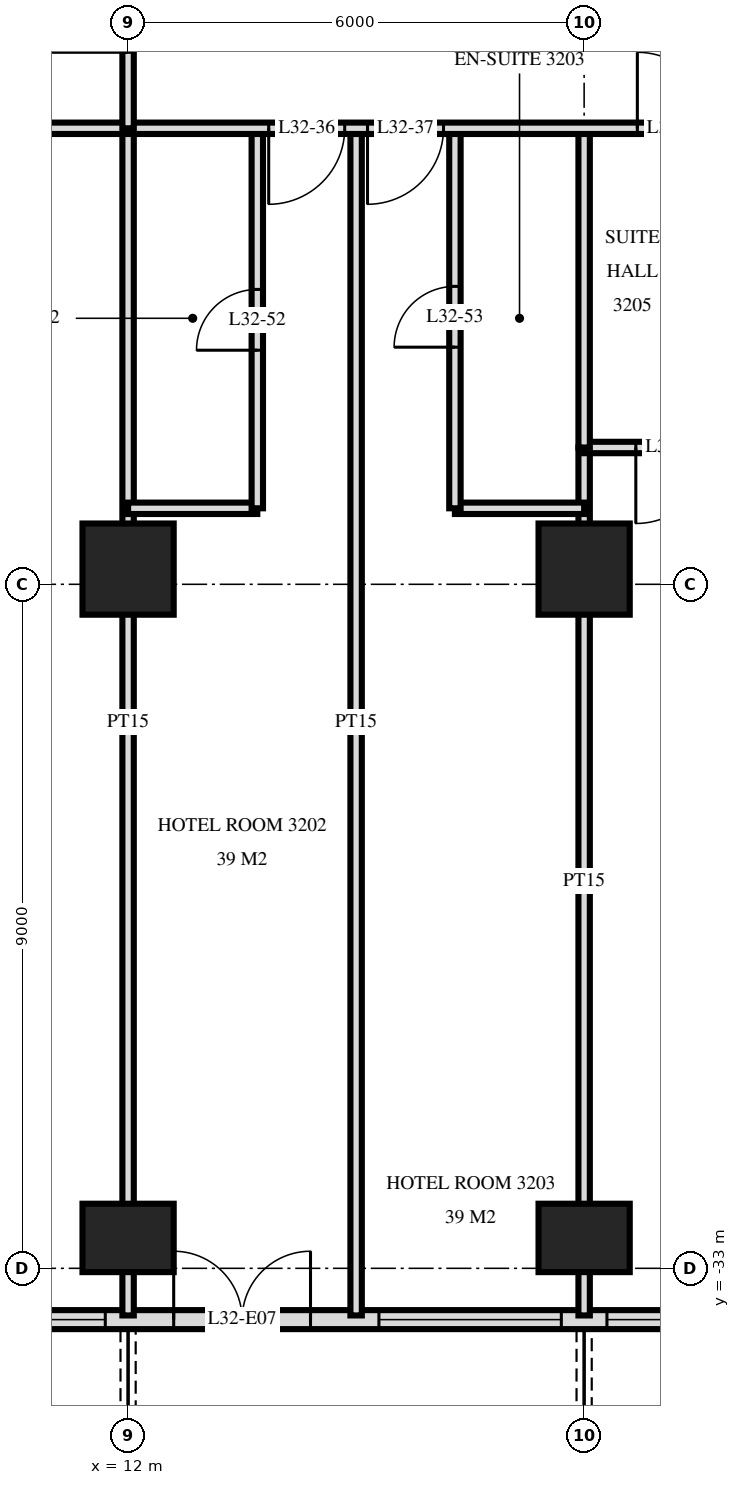
"""IFC4 building model, lengths in metres.
Left out: names, types, materials, properties, quantities, classifications, styles, units other than length and angle.
Written with IfcOpenShell. Run it as: python <this file> out.ifc"""

import sys

from ifc_helpers import new_model, si_unit, direction, frame, frame_2d, origin, origin_2d, place, context, subcontext, project, spatial, rectangle, extrude, element, fill, save


model = new_model("IFC4")
c1 = context("Model", 3, precision=1e-05, world=origin(), true_north=direction((0.0, 1.0)))
c2 = subcontext(c1, "Body", "Model", "MODEL_VIEW")
j1 = project(units=[si_unit("LENGTHUNIT", "METRE"), si_unit("PLANEANGLEUNIT", "RADIAN")], contexts=[c1])
p1 = place(None, origin())
s1 = spatial("IfcSite", under=j1, at=p1, CompositionType="ELEMENT")
p2 = place(p1, origin())
s2 = spatial("IfcBuilding", under=s1, at=p2, CompositionType="ELEMENT")
p3 = place(p2, frame((0.0, 0.0, 127.2)))
s3 = spatial("IfcBuildingStorey", under=s2, at=p3, CompositionType="ELEMENT", Elevation=127.2)
p4 = place(p3, frame((12.0, -32.6, 0.0), z_axis=(0.0, 0.0, 1.0), x_axis=(1.0, 0.0, 0.0)))
e1 = element("IfcColumn", 1, at=p4, inside=s3, PredefinedType="COLUMN", context=c2, shape_type="SweptSolid", body=[
    extrude(rectangle(XDim=1.2, YDim=0.9, at=origin_2d()), origin(), (0.0, 0.0, 1.0), 3.6),
])
p5 = place(p3, frame((12.0, -23.8, 0.0), z_axis=(0.0, 0.0, 1.0), x_axis=(1.0, 0.0, 0.0)))
e2 = element("IfcColumn", 2, at=p5, inside=s3, PredefinedType="COLUMN", context=c2, shape_type="SweptSolid", body=[
    extrude(rectangle(XDim=1.2, YDim=1.2, at=origin_2d()), origin(), (0.0, 0.0, 1.0), 3.6),
])
p6 = place(p3, frame((18.0, -32.6, 0.0), z_axis=(0.0, 0.0, 1.0), x_axis=(1.0, 0.0, 0.0)))
e3 = element("IfcColumn", 3, at=p6, inside=s3, PredefinedType="COLUMN", context=c2, shape_type="SweptSolid", body=[
    extrude(rectangle(XDim=1.2, YDim=0.9, at=origin_2d()), origin(), (0.0, 0.0, 1.0), 3.6),
])
p7 = place(p3, frame((18.0, -23.8, 0.0), z_axis=(0.0, 0.0, 1.0), x_axis=(1.0, 0.0, 0.0)))
e4 = element("IfcColumn", 4, at=p7, inside=s3, PredefinedType="COLUMN", context=c2, shape_type="SweptSolid", body=[
    extrude(rectangle(XDim=1.2, YDim=1.2, at=origin_2d()), origin(), (0.0, 0.0, 1.0), 3.6),
])
p8 = place(p3, frame((-23.675, -33.675, 0.0), z_axis=(0.0, 0.0, 1.0), x_axis=(1.0, 0.0, 0.0)))
e5 = element("IfcWall", 5, at=p8, inside=s3, PredefinedType="SOLIDWALL", context=c2, shape_type="SweptSolid", body=[
    extrude(rectangle(XDim=47.351, YDim=0.25, at=frame_2d((23.675, 0.0))), origin(), (0.0, 0.0, 1.0), 3.32),
])
p9 = place(p8, frame((3.425, 0.0, 0.0)))
e6 = element("IfcOpeningElement", 6, at=p9, cuts=e5, PredefinedType="OPENING", context=c2, shape_type="SweptSolid", body=[
    extrude(rectangle(XDim=1.8, YDim=2.4, at=frame_2d((0.9, 1.2))), frame((0.0, 0.135, 0.0), z_axis=(0.0, -1.0, 0.0), x_axis=(1.0, 0.0, 0.0)), (0.0, 0.0, 1.0), 0.27),
])
p10 = place(p8, frame((6.275, 0.0, 0.0)))
e7 = element("IfcOpeningElement", 7, at=p10, cuts=e5, PredefinedType="OPENING", context=c2, shape_type="SweptSolid", body=[
    extrude(rectangle(XDim=1.8, YDim=2.4, at=frame_2d((0.9, 1.2))), frame((0.0, 0.135, 0.0), z_axis=(0.0, -1.0, 0.0), x_axis=(1.0, 0.0, 0.0)), (0.0, 0.0, 1.0), 0.27),
])
p11 = place(p8, frame((8.975, 0.0, 0.3)))
e8 = element("IfcOpeningElement", 8, at=p11, cuts=e5, PredefinedType="OPENING", context=c2, shape_type="SweptSolid", body=[
    extrude(rectangle(XDim=2.4, YDim=2.1, at=frame_2d((1.2, 1.05))), frame((0.0, 0.135, 0.0), z_axis=(0.0, -1.0, 0.0), x_axis=(1.0, 0.0, 0.0)), (0.0, 0.0, 1.0), 0.27),
])
p12 = place(p8, frame((12.275, 0.0, 0.0)))
e9 = element("IfcOpeningElement", 9, at=p12, cuts=e5, PredefinedType="OPENING", context=c2, shape_type="SweptSolid", body=[
    extrude(rectangle(XDim=1.8, YDim=2.4, at=frame_2d((0.9, 1.2))), frame((0.0, 0.135, 0.0), z_axis=(0.0, -1.0, 0.0), x_axis=(1.0, 0.0, 0.0)), (0.0, 0.0, 1.0), 0.27),
])
p13 = place(p8, frame((14.975, 0.0, 0.3)))
e10 = element("IfcOpeningElement", 10, at=p13, cuts=e5, PredefinedType="OPENING", context=c2, shape_type="SweptSolid", body=[
    extrude(rectangle(XDim=2.4, YDim=2.1, at=frame_2d((1.2, 1.05))), frame((0.0, 0.135, 0.0), z_axis=(0.0, -1.0, 0.0), x_axis=(1.0, 0.0, 0.0)), (0.0, 0.0, 1.0), 0.27),
])
p14 = place(p8, frame((17.975, 0.0, 0.3)))
e11 = element("IfcOpeningElement", 11, at=p14, cuts=e5, PredefinedType="OPENING", context=c2, shape_type="SweptSolid", body=[
    extrude(rectangle(XDim=2.4, YDim=2.1, at=frame_2d((1.2, 1.05))), frame((0.0, 0.135, 0.0), z_axis=(0.0, -1.0, 0.0), x_axis=(1.0, 0.0, 0.0)), (0.0, 0.0, 1.0), 0.27),
])
p15 = place(p8, frame((21.275, 0.0, 0.0)))
e12 = element("IfcOpeningElement", 12, at=p15, cuts=e5, PredefinedType="OPENING", context=c2, shape_type="SweptSolid", body=[
    extrude(rectangle(XDim=1.8, YDim=2.4, at=frame_2d((0.9, 1.2))), frame((0.0, 0.135, 0.0), z_axis=(0.0, -1.0, 0.0), x_axis=(1.0, 0.0, 0.0)), (0.0, 0.0, 1.0), 0.27),
])
p16 = place(p8, frame((24.275, 0.0, 0.0)))
e13 = element("IfcOpeningElement", 13, at=p16, cuts=e5, PredefinedType="OPENING", context=c2, shape_type="SweptSolid", body=[
    extrude(rectangle(XDim=1.8, YDim=2.4, at=frame_2d((0.9, 1.2))), frame((0.0, 0.135, 0.0), z_axis=(0.0, -1.0, 0.0), x_axis=(1.0, 0.0, 0.0)), (0.0, 0.0, 1.0), 0.27),
])
p17 = place(p8, frame((26.975, 0.0, 0.3)))
e14 = element("IfcOpeningElement", 14, at=p17, cuts=e5, PredefinedType="OPENING", context=c2, shape_type="SweptSolid", body=[
    extrude(rectangle(XDim=2.4, YDim=2.1, at=frame_2d((1.2, 1.05))), frame((0.0, 0.135, 0.0), z_axis=(0.0, -1.0, 0.0), x_axis=(1.0, 0.0, 0.0)), (0.0, 0.0, 1.0), 0.27),
])
p18 = place(p8, frame((30.275, 0.0, 0.0)))
e15 = element("IfcOpeningElement", 15, at=p18, cuts=e5, PredefinedType="OPENING", context=c2, shape_type="SweptSolid", body=[
    extrude(rectangle(XDim=1.8, YDim=2.4, at=frame_2d((0.9, 1.2))), frame((0.0, 0.135, 0.0), z_axis=(0.0, -1.0, 0.0), x_axis=(1.0, 0.0, 0.0)), (0.0, 0.0, 1.0), 0.27),
])
p19 = place(p8, frame((32.975, 0.0, 0.3)))
e16 = element("IfcOpeningElement", 16, at=p19, cuts=e5, PredefinedType="OPENING", context=c2, shape_type="SweptSolid", body=[
    extrude(rectangle(XDim=2.4, YDim=2.1, at=frame_2d((1.2, 1.05))), frame((0.0, 0.135, 0.0), z_axis=(0.0, -1.0, 0.0), x_axis=(1.0, 0.0, 0.0)), (0.0, 0.0, 1.0), 0.27),
])
p20 = place(p8, frame((36.275, 0.0, 0.0)))
e17 = element("IfcOpeningElement", 17, at=p20, cuts=e5, PredefinedType="OPENING", context=c2, shape_type="SweptSolid", body=[
    extrude(rectangle(XDim=1.8, YDim=2.4, at=frame_2d((0.9, 1.2))), frame((0.0, 0.135, 0.0), z_axis=(0.0, -1.0, 0.0), x_axis=(1.0, 0.0, 0.0)), (0.0, 0.0, 1.0), 0.27),
])
p21 = place(p8, frame((38.975, 0.0, 0.3)))
e18 = element("IfcOpeningElement", 18, at=p21, cuts=e5, PredefinedType="OPENING", context=c2, shape_type="SweptSolid", body=[
    extrude(rectangle(XDim=2.4, YDim=2.1, at=frame_2d((1.2, 1.05))), frame((0.0, 0.135, 0.0), z_axis=(0.0, -1.0, 0.0), x_axis=(1.0, 0.0, 0.0)), (0.0, 0.0, 1.0), 0.27),
])
p22 = place(p8, frame((41.975, 0.0, 0.3)))
e19 = element("IfcOpeningElement", 19, at=p22, cuts=e5, PredefinedType="OPENING", context=c2, shape_type="SweptSolid", body=[
    extrude(rectangle(XDim=2.4, YDim=2.1, at=frame_2d((1.2, 1.05))), frame((0.0, 0.135, 0.0), z_axis=(0.0, -1.0, 0.0), x_axis=(1.0, 0.0, 0.0)), (0.0, 0.0, 1.0), 0.27),
])
p23 = place(p8, frame((45.125, 0.0, 0.0)))
e20 = element("IfcOpeningElement", 20, at=p23, cuts=e5, PredefinedType="OPENING", context=c2, shape_type="SweptSolid", body=[
    extrude(rectangle(XDim=1.8, YDim=2.4, at=frame_2d((0.9, 1.2))), frame((0.0, 0.135, 0.0), z_axis=(0.0, -1.0, 0.0), x_axis=(1.0, 0.0, 0.0)), (0.0, 0.0, 1.0), 0.27),
])
p24 = place(p3, frame((18.0, -22.2, 0.0), z_axis=(0.0, 0.0, 1.0), x_axis=(0.0, 1.0, 0.0)))
e21 = element("IfcWall", 21, at=p24, inside=s3, PredefinedType="PARTITIONING", context=c2, shape_type="SweptSolid", body=[
    extrude(rectangle(XDim=4.2, YDim=0.15, at=frame_2d((2.1, 0.0))), origin(), (0.0, 0.0, 1.0), 3.32),
])
p25 = place(p3, frame((18.0, -33.62, 0.0), z_axis=(0.0, 0.0, 1.0), x_axis=(0.0, 1.0, 0.0)))
e22 = element("IfcWall", 22, at=p25, inside=s3, PredefinedType="PARTITIONING", context=c2, shape_type="SweptSolid", body=[
    extrude(rectangle(XDim=11.42, YDim=0.15, at=frame_2d((5.71, 0.0))), origin(), (0.0, 0.0, 1.0), 3.32),
])
p26 = place(p3, frame((16.3, -23.0, 0.0), z_axis=(0.0, 0.0, 1.0), x_axis=(0.0, 1.0, 0.0)))
e23 = element("IfcWall", 23, at=p26, inside=s3, PredefinedType="PARTITIONING", context=c2, shape_type="SweptSolid", body=[
    extrude(rectangle(XDim=5.0, YDim=0.15, at=frame_2d((2.5, 0.0))), origin(), (0.0, 0.0, 1.0), 3.32),
])
p27 = place(p26, frame((2.12, 0.0, 0.0)))
e24 = element("IfcOpeningElement", 24, at=p27, cuts=e23, PredefinedType="OPENING", context=c2, shape_type="SweptSolid", body=[
    extrude(rectangle(XDim=0.8, YDim=2.1, at=frame_2d((0.4, 1.05))), frame((0.0, 0.085, 0.0), z_axis=(0.0, -1.0, 0.0), x_axis=(1.0, 0.0, 0.0)), (0.0, 0.0, 1.0), 0.17),
])
p28 = place(p3, frame((15.0, -33.62, 0.0), z_axis=(0.0, 0.0, 1.0), x_axis=(0.0, 1.0, 0.0)))
e25 = element("IfcWall", 25, at=p28, inside=s3, PredefinedType="PARTITIONING", context=c2, shape_type="SweptSolid", body=[
    extrude(rectangle(XDim=15.62, YDim=0.15, at=frame_2d((7.81, 0.0))), origin(), (0.0, 0.0, 1.0), 3.32),
])
p29 = place(p3, frame((13.7, -23.0, 0.0), z_axis=(0.0, 0.0, 1.0), x_axis=(0.0, 1.0, 0.0)))
e26 = element("IfcWall", 26, at=p29, inside=s3, PredefinedType="PARTITIONING", context=c2, shape_type="SweptSolid", body=[
    extrude(rectangle(XDim=5.0, YDim=0.15, at=frame_2d((2.5, 0.0))), origin(), (0.0, 0.0, 1.0), 3.32),
])
p30 = place(p29, frame((2.08, 0.0, 0.0)))
e27 = element("IfcOpeningElement", 27, at=p30, cuts=e26, PredefinedType="OPENING", context=c2, shape_type="SweptSolid", body=[
    extrude(rectangle(XDim=0.8, YDim=2.1, at=frame_2d((0.4, 1.05))), frame((0.0, 0.085, 0.0), z_axis=(0.0, -1.0, 0.0), x_axis=(1.0, 0.0, 0.0)), (0.0, 0.0, 1.0), 0.17),
])
p31 = place(p3, frame((12.0, -18.0, 0.0), z_axis=(0.0, 0.0, 1.0), x_axis=(0.0, 1.0, 0.0)))
e28 = element("IfcWall", 28, at=p31, inside=s3, PredefinedType="PARTITIONING", context=c2, shape_type="SweptSolid", body=[
    extrude(rectangle(XDim=2.95, YDim=0.15, at=frame_2d((1.475, 0.0))), origin(), (0.0, 0.0, 1.0), 3.32),
])
p32 = place(p31, frame((1.0, 0.0, 0.0)))
e29 = element("IfcOpeningElement", 29, at=p32, cuts=e28, PredefinedType="OPENING", context=c2, shape_type="SweptSolid", body=[
    extrude(rectangle(XDim=1.0, YDim=2.1, at=frame_2d((0.5, 1.05))), frame((0.0, 0.085, 0.0), z_axis=(0.0, -1.0, 0.0), x_axis=(1.0, 0.0, 0.0)), (0.0, 0.0, 1.0), 0.17),
])
p33 = place(p3, frame((12.0, -33.62, 0.0), z_axis=(0.0, 0.0, 1.0), x_axis=(0.0, 1.0, 0.0)))
e30 = element("IfcWall", 30, at=p33, inside=s3, PredefinedType="PARTITIONING", context=c2, shape_type="SweptSolid", body=[
    extrude(rectangle(XDim=15.62, YDim=0.15, at=frame_2d((7.81, 0.0))), origin(), (0.0, 0.0, 1.0), 3.32),
])
for number, where, z_axis, x_axis in (
    (31, (12.0, -23.0, 0.0), (0.0, 0.0, 1.0), (1.0, 0.0, 0.0)),
    (32, (16.3, -23.0, 0.0), (0.0, 0.0, 1.0), (1.0, 0.0, 0.0)),
):
    element("IfcWall", number, at=place(p3, frame(where, z_axis=z_axis, x_axis=x_axis)), inside=s3, PredefinedType="PARTITIONING", context=c2, shape_type="SweptSolid", body=[
        extrude(rectangle(XDim=1.7, YDim=0.15, at=frame_2d((0.85, 0.0))), origin(), (0.0, 0.0, 1.0), 3.32),
    ])
p34 = place(p3, frame((18.0, -22.2, 0.0), z_axis=(0.0, 0.0, 1.0), x_axis=(1.0, 0.0, 0.0)))
e33 = element("IfcWall", 33, at=p34, inside=s3, PredefinedType="PARTITIONING", context=c2, shape_type="SweptSolid", body=[
    extrude(rectangle(XDim=2.4, YDim=0.15, at=frame_2d((1.2, 0.0))), origin(), (0.0, 0.0, 1.0), 3.32),
])
p35 = place(p34, frame((0.68, 0.0, 0.0)))
e34 = element("IfcOpeningElement", 34, at=p35, cuts=e33, PredefinedType="OPENING", context=c2, shape_type="SweptSolid", body=[
    extrude(rectangle(XDim=1.0, YDim=2.1, at=frame_2d((0.5, 1.05))), frame((0.0, 0.085, 0.0), z_axis=(0.0, -1.0, 0.0), x_axis=(1.0, 0.0, 0.0)), (0.0, 0.0, 1.0), 0.17),
])
p36 = place(p3, frame((-28.02, -18.0, 0.0), z_axis=(0.0, 0.0, 1.0), x_axis=(1.0, 0.0, 0.0)))
e35 = element("IfcWall", 35, at=p36, inside=s3, PredefinedType="PARTITIONING", context=c2, shape_type="SweptSolid", body=[
    extrude(rectangle(XDim=56.04, YDim=0.15, at=frame_2d((28.02, 0.0))), origin(), (0.0, 0.0, 1.0), 3.32),
])
p37 = place(p36, frame((13.17, 0.0, 0.0)))
e36 = element("IfcOpeningElement", 36, at=p37, cuts=e35, PredefinedType="OPENING", context=c2, shape_type="SweptSolid", body=[
    extrude(rectangle(XDim=1.0, YDim=2.1, at=frame_2d((0.5, 1.05))), frame((0.0, 0.085, 0.0), z_axis=(0.0, -1.0, 0.0), x_axis=(1.0, 0.0, 0.0)), (0.0, 0.0, 1.0), 0.17),
])
p38 = place(p36, frame((11.32, 0.0, 0.0)))
e37 = element("IfcOpeningElement", 37, at=p38, cuts=e35, PredefinedType="OPENING", context=c2, shape_type="SweptSolid", body=[
    extrude(rectangle(XDim=1.0, YDim=2.1, at=frame_2d((0.5, 1.05))), frame((0.0, 0.085, 0.0), z_axis=(0.0, -1.0, 0.0), x_axis=(1.0, 0.0, 0.0)), (0.0, 0.0, 1.0), 0.17),
])
p39 = place(p36, frame((41.87, 0.0, 0.0)))
e38 = element("IfcOpeningElement", 38, at=p39, cuts=e35, PredefinedType="OPENING", context=c2, shape_type="SweptSolid", body=[
    extrude(rectangle(XDim=1.0, YDim=2.1, at=frame_2d((0.5, 1.05))), frame((0.0, 0.085, 0.0), z_axis=(0.0, -1.0, 0.0), x_axis=(1.0, 0.0, 0.0)), (0.0, 0.0, 1.0), 0.17),
])
p40 = place(p36, frame((43.17, 0.0, 0.0)))
e39 = element("IfcOpeningElement", 39, at=p40, cuts=e35, PredefinedType="OPENING", context=c2, shape_type="SweptSolid", body=[
    extrude(rectangle(XDim=1.0, YDim=2.1, at=frame_2d((0.5, 1.05))), frame((0.0, 0.085, 0.0), z_axis=(0.0, -1.0, 0.0), x_axis=(1.0, 0.0, 0.0)), (0.0, 0.0, 1.0), 0.17),
])
p41 = place(p36, frame((46.72, 0.0, 0.0)))
e40 = element("IfcOpeningElement", 40, at=p41, cuts=e35, PredefinedType="OPENING", context=c2, shape_type="SweptSolid", body=[
    extrude(rectangle(XDim=1.0, YDim=2.1, at=frame_2d((0.5, 1.05))), frame((0.0, 0.085, 0.0), z_axis=(0.0, -1.0, 0.0), x_axis=(1.0, 0.0, 0.0)), (0.0, 0.0, 1.0), 0.17),
])
p42 = place(p36, frame((21.52, 0.0, 0.0)))
e41 = element("IfcOpeningElement", 41, at=p42, cuts=e35, PredefinedType="OPENING", context=c2, shape_type="SweptSolid", body=[
    extrude(rectangle(XDim=1.0, YDim=2.1, at=frame_2d((0.5, 1.05))), frame((0.0, 0.085, 0.0), z_axis=(0.0, -1.0, 0.0), x_axis=(1.0, 0.0, 0.0)), (0.0, 0.0, 1.0), 0.17),
])
p43 = place(p36, frame((33.52, 0.0, 0.0)))
e42 = element("IfcOpeningElement", 42, at=p43, cuts=e35, PredefinedType="OPENING", context=c2, shape_type="SweptSolid", body=[
    extrude(rectangle(XDim=1.0, YDim=2.1, at=frame_2d((0.5, 1.05))), frame((0.0, 0.085, 0.0), z_axis=(0.0, -1.0, 0.0), x_axis=(1.0, 0.0, 0.0)), (0.0, 0.0, 1.0), 0.17),
])
p44 = place(p19, origin())
e43 = element("IfcWindow", 43, at=p44, inside=s3, PartitioningType="SINGLE_PANEL", PredefinedType="WINDOW", context=c2, shape_type="SweptSolid", body=[
    extrude(rectangle(XDim=2.4, YDim=2.1, at=frame_2d((1.2, 1.05))), frame((0.0, 0.03, 0.0), z_axis=(0.0, -1.0, 0.0), x_axis=(1.0, 0.0, 0.0)), (0.0, 0.0, 1.0), 0.06),
])
fill(e16, e43)
p45 = place(p20, origin())
e44 = element("IfcDoor", 44, at=p45, inside=s3, OperationType="DOUBLE_DOOR_SINGLE_SWING", PredefinedType="DOOR", context=c2, shape_type="SweptSolid", body=[
    extrude(rectangle(XDim=1.8, YDim=2.4, at=frame_2d((0.9, 1.2))), frame((0.0, 0.025, 0.0), z_axis=(0.0, -1.0, 0.0), x_axis=(1.0, 0.0, 0.0)), (0.0, 0.0, 1.0), 0.05),
])
fill(e17, e44)
p46 = place(p21, origin())
e45 = element("IfcWindow", 45, at=p46, inside=s3, PartitioningType="SINGLE_PANEL", PredefinedType="WINDOW", context=c2, shape_type="SweptSolid", body=[
    extrude(rectangle(XDim=2.4, YDim=2.1, at=frame_2d((1.2, 1.05))), frame((0.0, 0.03, 0.0), z_axis=(0.0, -1.0, 0.0), x_axis=(1.0, 0.0, 0.0)), (0.0, 0.0, 1.0), 0.06),
])
fill(e18, e45)
p47 = place(p22, origin())
e46 = element("IfcWindow", 46, at=p47, inside=s3, PartitioningType="SINGLE_PANEL", PredefinedType="WINDOW", context=c2, shape_type="SweptSolid", body=[
    extrude(rectangle(XDim=2.4, YDim=2.1, at=frame_2d((1.2, 1.05))), frame((0.0, 0.03, 0.0), z_axis=(0.0, -1.0, 0.0), x_axis=(1.0, 0.0, 0.0)), (0.0, 0.0, 1.0), 0.06),
])
fill(e19, e46)
p48 = place(p39, frame((0.5, 0.0, 0.0), z_axis=(0.0, 0.0, 1.0), x_axis=(-1.0, 0.0, 0.0)))
e47 = element("IfcDoor", 47, at=p48, inside=s3, OperationType="SINGLE_SWING_LEFT", PredefinedType="DOOR", context=c2, shape_type="SweptSolid", body=[
    extrude(rectangle(XDim=1.0, YDim=2.1, at=frame_2d((0.0, 1.05))), frame((0.0, -0.025, 0.0), z_axis=(0.0, 1.0, 0.0), x_axis=(-1.0, 0.0, 0.0)), (0.0, 0.0, 1.0), 0.05),
])
fill(e38, e47)
p49 = place(p40, frame((0.5, 0.0, 0.0), z_axis=(0.0, 0.0, 1.0), x_axis=(-1.0, 0.0, 0.0)))
e48 = element("IfcDoor", 48, at=p49, inside=s3, OperationType="SINGLE_SWING_LEFT", PredefinedType="DOOR", context=c2, shape_type="SweptSolid", body=[
    extrude(rectangle(XDim=1.0, YDim=2.1, at=frame_2d((0.0, 1.05))), frame((0.0, -0.025, 0.0), z_axis=(0.0, 1.0, 0.0), x_axis=(-1.0, 0.0, 0.0)), (0.0, 0.0, 1.0), 0.05),
])
fill(e39, e48)
p50 = place(p41, origin())
e49 = element("IfcDoor", 49, at=p50, inside=s3, OperationType="SINGLE_SWING_RIGHT", PredefinedType="DOOR", context=c2, shape_type="SweptSolid", body=[
    extrude(rectangle(XDim=1.0, YDim=2.1, at=frame_2d((0.5, 1.05))), frame((0.0, 0.025, 0.0), z_axis=(0.0, -1.0, 0.0), x_axis=(1.0, 0.0, 0.0)), (0.0, 0.0, 1.0), 0.05),
])
fill(e40, e49)
p51 = place(p30, origin())
e50 = element("IfcDoor", 50, at=p51, inside=s3, OperationType="SINGLE_SWING_RIGHT", PredefinedType="DOOR", context=c2, shape_type="SweptSolid", body=[
    extrude(rectangle(XDim=0.8, YDim=2.1, at=frame_2d((0.4, 1.05))), frame((0.0, 0.025, 0.0), z_axis=(0.0, -1.0, 0.0), x_axis=(1.0, 0.0, 0.0)), (0.0, 0.0, 1.0), 0.05),
])
fill(e27, e50)
p52 = place(p27, origin())
e51 = element("IfcDoor", 51, at=p52, inside=s3, OperationType="SINGLE_SWING_RIGHT", PredefinedType="DOOR", context=c2, shape_type="SweptSolid", body=[
    extrude(rectangle(XDim=0.8, YDim=2.1, at=frame_2d((0.4, 1.05))), frame((0.0, 0.025, 0.0), z_axis=(0.0, -1.0, 0.0), x_axis=(1.0, 0.0, 0.0)), (0.0, 0.0, 1.0), 0.05),
])
fill(e24, e51)
p53 = place(p35, frame((0.5, 0.0, 0.0), z_axis=(0.0, 0.0, 1.0), x_axis=(-1.0, 0.0, 0.0)))
e52 = element("IfcDoor", 52, at=p53, inside=s3, OperationType="SINGLE_SWING_LEFT", PredefinedType="DOOR", context=c2, shape_type="SweptSolid", body=[
    extrude(rectangle(XDim=1.0, YDim=2.1, at=frame_2d((0.0, 1.05))), frame((0.0, -0.025, 0.0), z_axis=(0.0, 1.0, 0.0), x_axis=(-1.0, 0.0, 0.0)), (0.0, 0.0, 1.0), 0.05),
])
fill(e34, e52)
save(model, sys.argv[1])
